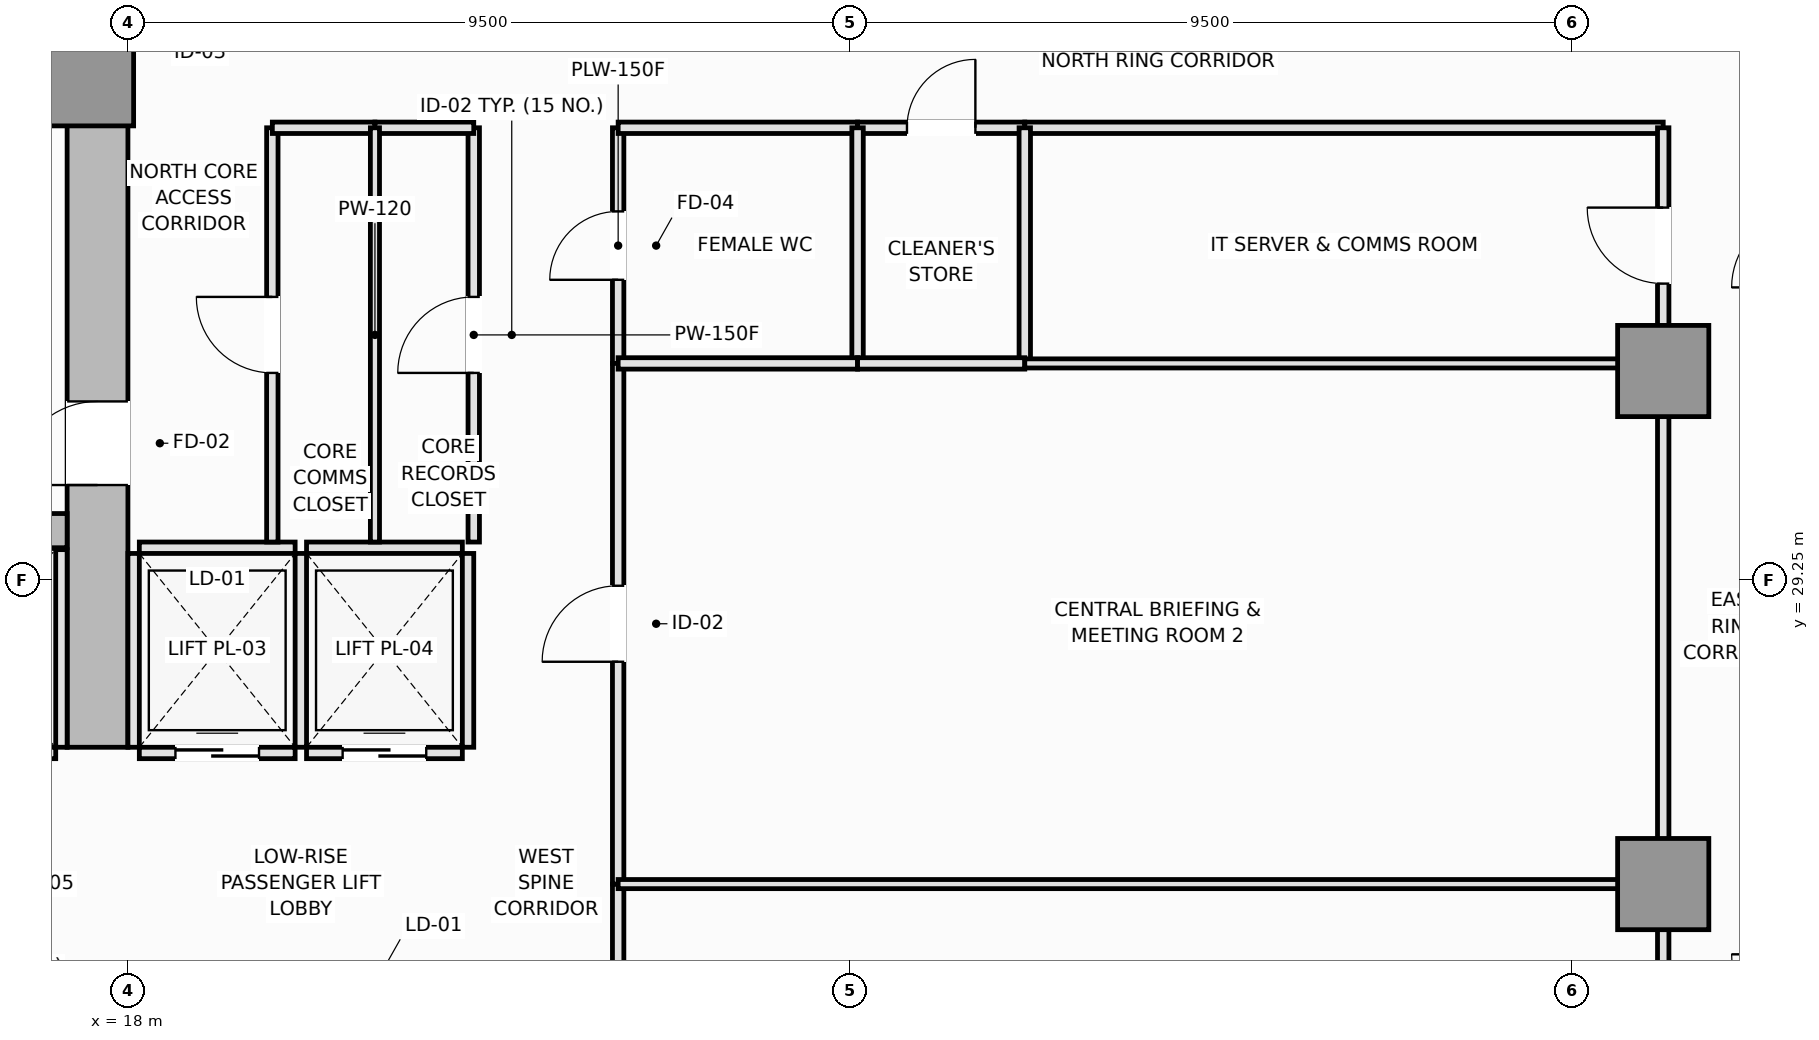
"""IFC4 building model, lengths in metres.
Left out: names, types, materials, properties, quantities, classifications, styles, units other than length and angle.
Written with IfcOpenShell. Run it as: python <this file> out.ifc"""

import sys

from ifc_helpers import new_model, si_unit, direction, frame, frame_2d, origin, origin_2d, place, context, subcontext, project, spatial, rectangle, extrude, element, fill, save


model = new_model("IFC4")
c1 = context("Model", 3, precision=1e-05, world=origin(), true_north=direction((0.0, 1.0)))
c2 = subcontext(c1, "Body", "Model", "MODEL_VIEW")
j1 = project(units=[si_unit("LENGTHUNIT", "METRE"), si_unit("PLANEANGLEUNIT", "RADIAN")], contexts=[c1])
p1 = place(None, origin())
s1 = spatial("IfcSite", under=j1, at=p1, CompositionType="ELEMENT")
p2 = place(p1, origin())
s2 = spatial("IfcBuilding", under=s1, at=p2, CompositionType="ELEMENT")
p3 = place(p2, frame((0.0, 0.0, 54.0)))
s3 = spatial("IfcBuildingStorey", under=s2, at=p3, CompositionType="ELEMENT", Elevation=54.0)
p4 = place(p3, frame((4.5, 36.1, 0.0), z_axis=(0.0, 0.0, 1.0), x_axis=(1.0, 0.0, 0.0)))
e1 = element("IfcWall", 1, at=p4, inside=s3, PredefinedType="SHEAR", context=c2, shape_type="SweptSolid", body=[
    extrude(rectangle(XDim=13.5, YDim=0.8, at=frame_2d((6.75, 0.0))), origin(), (0.0, 0.0, 1.0), 3.55),
])
p5 = place(p3, frame((17.6, 27.05, 0.0), z_axis=(0.0, 0.0, 1.0), x_axis=(0.0, 1.0, 0.0)))
e2 = element("IfcWall", 2, at=p5, inside=s3, PredefinedType="SHEAR", context=c2, shape_type="SweptSolid", body=[
    extrude(rectangle(XDim=8.65, YDim=0.8, at=frame_2d((4.325, 0.0))), origin(), (0.0, 0.0, 1.0), 3.55),
])
p6 = place(p5, frame((3.45, 0.0, 0.0)))
e3 = element("IfcOpeningElement", 3, at=p6, cuts=e2, PredefinedType="OPENING", context=c2, shape_type="SweptSolid", body=[
    extrude(rectangle(XDim=1.1, YDim=2.15, at=frame_2d((0.55, 1.075))), frame((0.0, 0.41, 0.0), z_axis=(0.0, -1.0, 0.0), x_axis=(1.0, 0.0, 0.0)), (0.0, 0.0, 1.0), 0.82),
])
p7 = place(p3, frame((5.3, 29.9, 0.0), z_axis=(0.0, 0.0, 1.0), x_axis=(1.0, 0.0, 0.0)))
e4 = element("IfcWall", 4, at=p7, inside=s3, PredefinedType="SHEAR", context=c2, shape_type="SweptSolid", body=[
    extrude(rectangle(XDim=11.9, YDim=0.45, at=frame_2d((5.95, 0.0))), origin(), (0.0, 0.0, 1.0), 3.55),
])
p8 = place(p3, frame((17.4, 35.9, 0.0), z_axis=(0.0, 0.0, 1.0), x_axis=(1.0, 0.0, 0.0)))
e5 = element("IfcColumn", 5, at=p8, inside=s3, PredefinedType="PILASTER", context=c2, shape_type="SweptSolid", body=[
    extrude(rectangle(XDim=1.35, YDim=1.35, at=origin_2d()), origin(), (0.0, 0.0, 1.0), 3.55),
])
for number, where, z_axis, x_axis in (
    (6, (38.2, 25.25, 0.0), (0.0, 0.0, 1.0), (1.0, 0.0, 0.0)),
    (7, (38.2, 32.0, 0.0), (0.0, 0.0, 1.0), (1.0, 0.0, 0.0)),
):
    element("IfcColumn", number, at=place(p3, frame(where, z_axis=z_axis, x_axis=x_axis)), inside=s3, PredefinedType="COLUMN", context=c2, shape_type="SweptSolid", body=[
        extrude(rectangle(XDim=1.2, YDim=1.2, at=origin_2d()), origin(), (0.0, 0.0, 1.0), 3.55),
    ])
p9 = place(p3, frame((18.15, 26.975, 0.0), z_axis=(0.0, 0.0, 1.0), x_axis=(1.0, 0.0, 0.0)))
e8 = element("IfcWall", 8, at=p9, inside=s3, PredefinedType="PARTITIONING", context=c2, shape_type="SweptSolid", body=[
    extrude(rectangle(XDim=2.05, YDim=0.15, at=frame_2d((1.025, 0.0))), origin(), (0.0, 0.0, 1.0), 3.37),
])
p10 = place(p9, frame((0.475, 0.0, 0.0)))
e9 = element("IfcOpeningElement", 9, at=p10, cuts=e8, PredefinedType="OPENING", context=c2, shape_type="SweptSolid", body=[
    extrude(rectangle(XDim=1.1, YDim=2.2, at=frame_2d((0.55, 1.1))), frame((0.0, 0.085, 0.0), z_axis=(0.0, -1.0, 0.0), x_axis=(1.0, 0.0, 0.0)), (0.0, 0.0, 1.0), 0.17),
])
p11 = place(p3, frame((18.15, 29.675, 0.0), z_axis=(0.0, 0.0, 1.0), x_axis=(1.0, 0.0, 0.0)))
e10 = element("IfcWall", 10, at=p11, inside=s3, PredefinedType="PARTITIONING", context=c2, shape_type="SweptSolid", body=[
    extrude(rectangle(XDim=2.05, YDim=0.15, at=frame_2d((1.025, 0.0))), origin(), (0.0, 0.0, 1.0), 3.37),
])
for number, where, z_axis, x_axis in (
    (11, (18.075, 27.05, 0.0), (0.0, 0.0, 1.0), (0.0, 1.0, 0.0)),
    (12, (20.275, 27.05, 0.0), (0.0, 0.0, 1.0), (0.0, 1.0, 0.0)),
):
    element("IfcWall", number, at=place(p3, frame(where, z_axis=z_axis, x_axis=x_axis)), inside=s3, PredefinedType="PARTITIONING", context=c2, shape_type="SweptSolid", body=[
        extrude(rectangle(XDim=2.55, YDim=0.15, at=frame_2d((1.275, 0.0))), origin(), (0.0, 0.0, 1.0), 3.37),
    ])
p12 = place(p3, frame((20.35, 26.975, 0.0), z_axis=(0.0, 0.0, 1.0), x_axis=(1.0, 0.0, 0.0)))
e13 = element("IfcWall", 13, at=p12, inside=s3, PredefinedType="PARTITIONING", context=c2, shape_type="SweptSolid", body=[
    extrude(rectangle(XDim=2.05, YDim=0.15, at=frame_2d((1.025, 0.0))), origin(), (0.0, 0.0, 1.0), 3.37),
])
p13 = place(p12, frame((0.475, 0.0, 0.0)))
e14 = element("IfcOpeningElement", 14, at=p13, cuts=e13, PredefinedType="OPENING", context=c2, shape_type="SweptSolid", body=[
    extrude(rectangle(XDim=1.1, YDim=2.2, at=frame_2d((0.55, 1.1))), frame((0.0, 0.085, 0.0), z_axis=(0.0, -1.0, 0.0), x_axis=(1.0, 0.0, 0.0)), (0.0, 0.0, 1.0), 0.17),
])
p14 = place(p3, frame((20.35, 29.675, 0.0), z_axis=(0.0, 0.0, 1.0), x_axis=(1.0, 0.0, 0.0)))
e15 = element("IfcWall", 15, at=p14, inside=s3, PredefinedType="PARTITIONING", context=c2, shape_type="SweptSolid", body=[
    extrude(rectangle(XDim=2.05, YDim=0.15, at=frame_2d((1.025, 0.0))), origin(), (0.0, 0.0, 1.0), 3.37),
])
p15 = place(p3, frame((22.475, 27.05, 0.0), z_axis=(0.0, 0.0, 1.0), x_axis=(0.0, 1.0, 0.0)))
e16 = element("IfcWall", 16, at=p15, inside=s3, PredefinedType="PARTITIONING", context=c2, shape_type="SweptSolid", body=[
    extrude(rectangle(XDim=2.55, YDim=0.15, at=frame_2d((1.275, 0.0))), origin(), (0.0, 0.0, 1.0), 3.37),
])
p16 = place(p3, frame((14.5, 26.975, 0.0), z_axis=(0.0, 0.0, 1.0), x_axis=(1.0, 0.0, 0.0)))
e17 = element("IfcWall", 17, at=p16, inside=s3, PredefinedType="PARTITIONING", context=c2, shape_type="SweptSolid", body=[
    extrude(rectangle(XDim=2.55, YDim=0.15, at=frame_2d((1.275, 0.0))), origin(), (0.0, 0.0, 1.0), 3.37),
])
p17 = place(p16, frame((0.625, 0.0, 0.0)))
e18 = element("IfcOpeningElement", 18, at=p17, cuts=e17, PredefinedType="OPENING", context=c2, shape_type="SweptSolid", body=[
    extrude(rectangle(XDim=1.3, YDim=2.2, at=frame_2d((0.65, 1.1))), frame((0.0, 0.085, 0.0), z_axis=(0.0, -1.0, 0.0), x_axis=(1.0, 0.0, 0.0)), (0.0, 0.0, 1.0), 0.17),
])
p18 = place(p3, frame((17.125, 27.05, 0.0), z_axis=(0.0, 0.0, 1.0), x_axis=(0.0, 1.0, 0.0)))
e19 = element("IfcWall", 19, at=p18, inside=s3, PredefinedType="PARTITIONING", context=c2, shape_type="SweptSolid", body=[
    extrude(rectangle(XDim=2.6, YDim=0.15, at=frame_2d((1.3, 0.0))), origin(), (0.0, 0.0, 1.0), 3.37),
])
p19 = place(p3, frame((22.55, 29.75, 0.0), z_axis=(0.0, 0.0, 1.0), x_axis=(0.0, 1.0, 0.0)))
e20 = element("IfcWall", 20, at=p19, inside=s3, PredefinedType="PARTITIONING", context=c2, shape_type="SweptSolid", body=[
    extrude(rectangle(XDim=5.45, YDim=0.15, at=frame_2d((2.725, 0.0))), origin(), (0.0, 0.0, 1.0), 3.01),
])
p20 = place(p19, frame((2.225, 0.0, 0.0)))
e21 = element("IfcOpeningElement", 21, at=p20, cuts=e20, PredefinedType="OPENING", context=c2, shape_type="SweptSolid", body=[
    extrude(rectangle(XDim=1.0, YDim=2.15, at=frame_2d((0.5, 1.075))), frame((0.0, 0.085, 0.0), z_axis=(0.0, -1.0, 0.0), x_axis=(1.0, 0.0, 0.0)), (0.0, 0.0, 1.0), 0.17),
])
p21 = place(p3, frame((24.45, 32.1, 0.0), z_axis=(0.0, 0.0, 1.0), x_axis=(0.0, 1.0, 0.0)))
e22 = element("IfcWall", 22, at=p21, inside=s3, PredefinedType="PLUMBINGWALL", context=c2, shape_type="SweptSolid", body=[
    extrude(rectangle(XDim=3.1, YDim=0.15, at=frame_2d((1.55, 0.0))), origin(), (0.0, 0.0, 1.0), 3.37),
])
p22 = place(p21, frame((1.1, 0.0, 0.0)))
e23 = element("IfcOpeningElement", 23, at=p22, cuts=e22, PredefinedType="OPENING", context=c2, shape_type="SweptSolid", body=[
    extrude(rectangle(XDim=0.9, YDim=2.1, at=frame_2d((0.45, 1.05))), frame((0.0, 0.085, 0.0), z_axis=(0.0, -1.0, 0.0), x_axis=(1.0, 0.0, 0.0)), (0.0, 0.0, 1.0), 0.17),
])
p23 = place(p3, frame((24.45, 18.4, 0.0), z_axis=(0.0, 0.0, 1.0), x_axis=(0.0, 1.0, 0.0)))
e24 = element("IfcWall", 24, at=p23, inside=s3, PredefinedType="PARTITIONING", context=c2, shape_type="SweptSolid", body=[
    extrude(rectangle(XDim=6.85, YDim=0.15, at=frame_2d((3.425, 0.0))), origin(), (0.0, 0.0, 1.0), 3.37),
])
p24 = place(p23, frame((2.925, 0.0, 0.0)))
e25 = element("IfcOpeningElement", 25, at=p24, cuts=e24, PredefinedType="OPENING", context=c2, shape_type="SweptSolid", body=[
    extrude(rectangle(XDim=1.0, YDim=2.15, at=frame_2d((0.5, 1.075))), frame((0.0, 0.085, 0.0), z_axis=(0.0, -1.0, 0.0), x_axis=(1.0, 0.0, 0.0)), (0.0, 0.0, 1.0), 0.17),
])
p25 = place(p3, frame((24.45, 25.25, 0.0), z_axis=(0.0, 0.0, 1.0), x_axis=(0.0, 1.0, 0.0)))
e26 = element("IfcWall", 26, at=p25, inside=s3, PredefinedType="PARTITIONING", context=c2, shape_type="SweptSolid", body=[
    extrude(rectangle(XDim=6.85, YDim=0.15, at=frame_2d((3.425, 0.0))), origin(), (0.0, 0.0, 1.0), 3.37),
])
p26 = place(p25, frame((2.925, 0.0, 0.0)))
e27 = element("IfcOpeningElement", 27, at=p26, cuts=e26, PredefinedType="OPENING", context=c2, shape_type="SweptSolid", body=[
    extrude(rectangle(XDim=1.0, YDim=2.15, at=frame_2d((0.5, 1.075))), frame((0.0, 0.085, 0.0), z_axis=(0.0, -1.0, 0.0), x_axis=(1.0, 0.0, 0.0)), (0.0, 0.0, 1.0), 0.17),
])
p27 = place(p3, frame((19.9, 29.75, 0.0), z_axis=(0.0, 0.0, 1.0), x_axis=(0.0, 1.0, 0.0)))
e28 = element("IfcWall", 28, at=p27, inside=s3, PredefinedType="PARTITIONING", context=c2, shape_type="SweptSolid", body=[
    extrude(rectangle(XDim=5.45, YDim=0.15, at=frame_2d((2.725, 0.0))), origin(), (0.0, 0.0, 1.0), 3.37),
])
p28 = place(p27, frame((2.225, 0.0, 0.0)))
e29 = element("IfcOpeningElement", 29, at=p28, cuts=e28, PredefinedType="OPENING", context=c2, shape_type="SweptSolid", body=[
    extrude(rectangle(XDim=1.0, YDim=2.15, at=frame_2d((0.5, 1.075))), frame((0.0, 0.085, 0.0), z_axis=(0.0, -1.0, 0.0), x_axis=(1.0, 0.0, 0.0)), (0.0, 0.0, 1.0), 0.17),
])
p29 = place(p3, frame((19.9, 35.2, 0.0), z_axis=(0.0, 0.0, 1.0), x_axis=(1.0, 0.0, 0.0)))
e30 = element("IfcWall", 30, at=p29, inside=s3, PredefinedType="PARTITIONING", context=c2, shape_type="SweptSolid", body=[
    extrude(rectangle(XDim=1.35, YDim=0.15, at=frame_2d((0.675, 0.0))), origin(), (0.0, 0.0, 1.0), 3.37),
])
p30 = place(p3, frame((21.25, 35.2, 0.0), z_axis=(0.0, 0.0, 1.0), x_axis=(1.0, 0.0, 0.0)))
e31 = element("IfcWall", 31, at=p30, inside=s3, PredefinedType="PARTITIONING", context=c2, shape_type="SweptSolid", body=[
    extrude(rectangle(XDim=1.3, YDim=0.15, at=frame_2d((0.65, 0.0))), origin(), (0.0, 0.0, 1.0), 3.37),
])
p31 = place(p3, frame((24.45, 35.2, 0.0), z_axis=(0.0, 0.0, 1.0), x_axis=(1.0, 0.0, 0.0)))
e32 = element("IfcWall", 32, at=p31, inside=s3, PredefinedType="PLUMBINGWALL", context=c2, shape_type="SweptSolid", body=[
    extrude(rectangle(XDim=3.15, YDim=0.15, at=frame_2d((1.575, 0.0))), origin(), (0.0, 0.0, 1.0), 3.37),
])
p32 = place(p3, frame((27.6, 35.2, 0.0), z_axis=(0.0, 0.0, 1.0), x_axis=(1.0, 0.0, 0.0)))
e33 = element("IfcWall", 33, at=p32, inside=s3, PredefinedType="PLUMBINGWALL", context=c2, shape_type="SweptSolid", body=[
    extrude(rectangle(XDim=2.2, YDim=0.15, at=frame_2d((1.1, 0.0))), origin(), (0.0, 0.0, 1.0), 3.37),
])
p33 = place(p32, frame((0.65, 0.0, 0.0)))
e34 = element("IfcOpeningElement", 34, at=p33, cuts=e33, PredefinedType="OPENING", context=c2, shape_type="SweptSolid", body=[
    extrude(rectangle(XDim=0.9, YDim=2.1, at=frame_2d((0.45, 1.05))), frame((0.0, 0.085, 0.0), z_axis=(0.0, -1.0, 0.0), x_axis=(1.0, 0.0, 0.0)), (0.0, 0.0, 1.0), 0.17),
])
p34 = place(p3, frame((29.8, 35.2, 0.0), z_axis=(0.0, 0.0, 1.0), x_axis=(1.0, 0.0, 0.0)))
e35 = element("IfcWall", 35, at=p34, inside=s3, PredefinedType="PARTITIONING", context=c2, shape_type="SweptSolid", body=[
    extrude(rectangle(XDim=8.4, YDim=0.15, at=frame_2d((4.2, 0.0))), origin(), (0.0, 0.0, 1.0), 3.37),
])
p35 = place(p3, frame((38.2, 32.1, 0.0), z_axis=(0.0, 0.0, 1.0), x_axis=(0.0, 1.0, 0.0)))
e36 = element("IfcWall", 36, at=p35, inside=s3, PredefinedType="PARTITIONING", context=c2, shape_type="SweptSolid", body=[
    extrude(rectangle(XDim=3.1, YDim=0.15, at=frame_2d((1.55, 0.0))), origin(), (0.0, 0.0, 1.0), 2.82),
])
p36 = place(p35, frame((1.05, 0.0, 0.0)))
e37 = element("IfcOpeningElement", 37, at=p36, cuts=e36, PredefinedType="OPENING", context=c2, shape_type="SweptSolid", body=[
    extrude(rectangle(XDim=1.0, YDim=2.15, at=frame_2d((0.5, 1.075))), frame((0.0, 0.085, 0.0), z_axis=(0.0, -1.0, 0.0), x_axis=(1.0, 0.0, 0.0)), (0.0, 0.0, 1.0), 0.17),
])
for number, where, z_axis, x_axis in (
    (38, (38.2, 18.4, 0.0), (0.0, 0.0, 1.0), (0.0, 1.0, 0.0)),
    (39, (38.2, 25.25, 0.0), (0.0, 0.0, 1.0), (0.0, 1.0, 0.0)),
):
    element("IfcWall", number, at=place(p3, frame(where, z_axis=z_axis, x_axis=x_axis)), inside=s3, PredefinedType="PARTITIONING", context=c2, shape_type="SweptSolid", body=[
        extrude(rectangle(XDim=6.85, YDim=0.15, at=frame_2d((3.425, 0.0))), origin(), (0.0, 0.0, 1.0), 2.82),
    ])
p37 = place(p3, frame((21.25, 29.75, 0.0), z_axis=(0.0, 0.0, 1.0), x_axis=(0.0, 1.0, 0.0)))
e40 = element("IfcWall", 40, at=p37, inside=s3, PredefinedType="PARTITIONING", context=c2, shape_type="SweptSolid", body=[
    extrude(rectangle(XDim=5.45, YDim=0.12, at=frame_2d((2.725, 0.0))), origin(), (0.0, 0.0, 1.0), 3.37),
])
p38 = place(p3, frame((27.6, 32.1, 0.0), z_axis=(0.0, 0.0, 1.0), x_axis=(0.0, 1.0, 0.0)))
e41 = element("IfcWall", 41, at=p38, inside=s3, PredefinedType="PLUMBINGWALL", context=c2, shape_type="SweptSolid", body=[
    extrude(rectangle(XDim=3.1, YDim=0.15, at=frame_2d((1.55, 0.0))), origin(), (0.0, 0.0, 1.0), 3.37),
])
p39 = place(p3, frame((24.45, 32.1, 0.0), z_axis=(0.0, 0.0, 1.0), x_axis=(1.0, 0.0, 0.0)))
e42 = element("IfcWall", 42, at=p39, inside=s3, PredefinedType="PLUMBINGWALL", context=c2, shape_type="SweptSolid", body=[
    extrude(rectangle(XDim=3.15, YDim=0.15, at=frame_2d((1.575, 0.0))), origin(), (0.0, 0.0, 1.0), 2.72),
])
p40 = place(p3, frame((29.8, 32.1, 0.0), z_axis=(0.0, 0.0, 1.0), x_axis=(0.0, 1.0, 0.0)))
e43 = element("IfcWall", 43, at=p40, inside=s3, PredefinedType="PLUMBINGWALL", context=c2, shape_type="SweptSolid", body=[
    extrude(rectangle(XDim=3.1, YDim=0.15, at=frame_2d((1.55, 0.0))), origin(), (0.0, 0.0, 1.0), 3.37),
])
p41 = place(p3, frame((27.6, 32.1, 0.0), z_axis=(0.0, 0.0, 1.0), x_axis=(1.0, 0.0, 0.0)))
e44 = element("IfcWall", 44, at=p41, inside=s3, PredefinedType="PLUMBINGWALL", context=c2, shape_type="SweptSolid", body=[
    extrude(rectangle(XDim=2.2, YDim=0.15, at=frame_2d((1.1, 0.0))), origin(), (0.0, 0.0, 1.0), 2.72),
])
p42 = place(p3, frame((29.8, 32.1, 0.0), z_axis=(0.0, 0.0, 1.0), x_axis=(1.0, 0.0, 0.0)))
e45 = element("IfcWall", 45, at=p42, inside=s3, PredefinedType="PARTITIONING", context=c2, shape_type="SweptSolid", body=[
    extrude(rectangle(XDim=8.4, YDim=0.12, at=frame_2d((4.2, 0.0))), origin(), (0.0, 0.0, 1.0), 2.72),
])
p43 = place(p3, frame((24.45, 25.25, 0.0), z_axis=(0.0, 0.0, 1.0), x_axis=(1.0, 0.0, 0.0)))
e46 = element("IfcWall", 46, at=p43, inside=s3, PredefinedType="PARTITIONING", context=c2, shape_type="SweptSolid", body=[
    extrude(rectangle(XDim=13.75, YDim=0.12, at=frame_2d((6.875, 0.0))), origin(), (0.0, 0.0, 1.0), 2.72),
])
p44 = place(p10, origin())
e47 = element("IfcDoor", 47, at=p44, inside=s3, OperationType="DOUBLE_DOOR_SLIDING", PredefinedType="DOOR", context=c2, shape_type="SweptSolid", body=[
    extrude(rectangle(XDim=1.1, YDim=2.2, at=frame_2d((0.55, 1.1))), frame((0.0, 0.025, 0.0), z_axis=(0.0, -1.0, 0.0), x_axis=(1.0, 0.0, 0.0)), (0.0, 0.0, 1.0), 0.05),
])
fill(e9, e47)
p45 = place(p13, origin())
e48 = element("IfcDoor", 48, at=p45, inside=s3, OperationType="DOUBLE_DOOR_SLIDING", PredefinedType="DOOR", context=c2, shape_type="SweptSolid", body=[
    extrude(rectangle(XDim=1.1, YDim=2.2, at=frame_2d((0.55, 1.1))), frame((0.0, 0.025, 0.0), z_axis=(0.0, -1.0, 0.0), x_axis=(1.0, 0.0, 0.0)), (0.0, 0.0, 1.0), 0.05),
])
fill(e14, e48)
p46 = place(p6, origin())
e49 = element("IfcDoor", 49, at=p46, inside=s3, OperationType="SINGLE_SWING_LEFT", PredefinedType="DOOR", context=c2, shape_type="SweptSolid", body=[
    extrude(rectangle(XDim=1.1, YDim=2.15, at=frame_2d((0.55, 1.075))), frame((0.0, 0.025, 0.0), z_axis=(0.0, -1.0, 0.0), x_axis=(1.0, 0.0, 0.0)), (0.0, 0.0, 1.0), 0.05),
])
fill(e3, e49)
p47 = place(p20, origin())
e50 = element("IfcDoor", 50, at=p47, inside=s3, OperationType="SINGLE_SWING_LEFT", PredefinedType="DOOR", context=c2, shape_type="SweptSolid", body=[
    extrude(rectangle(XDim=1.0, YDim=2.15, at=frame_2d((0.5, 1.075))), frame((0.0, 0.025, 0.0), z_axis=(0.0, -1.0, 0.0), x_axis=(1.0, 0.0, 0.0)), (0.0, 0.0, 1.0), 0.05),
])
fill(e21, e50)
p48 = place(p22, origin())
e51 = element("IfcDoor", 51, at=p48, inside=s3, OperationType="SINGLE_SWING_LEFT", PredefinedType="DOOR", context=c2, shape_type="SweptSolid", body=[
    extrude(rectangle(XDim=0.9, YDim=2.1, at=frame_2d((0.45, 1.05))), frame((0.0, 0.025, 0.0), z_axis=(0.0, -1.0, 0.0), x_axis=(1.0, 0.0, 0.0)), (0.0, 0.0, 1.0), 0.05),
])
fill(e23, e51)
p49 = place(p26, origin())
e52 = element("IfcDoor", 52, at=p49, inside=s3, OperationType="SINGLE_SWING_LEFT", PredefinedType="DOOR", context=c2, shape_type="SweptSolid", body=[
    extrude(rectangle(XDim=1.0, YDim=2.15, at=frame_2d((0.5, 1.075))), frame((0.0, 0.025, 0.0), z_axis=(0.0, -1.0, 0.0), x_axis=(1.0, 0.0, 0.0)), (0.0, 0.0, 1.0), 0.05),
])
fill(e27, e52)
p50 = place(p28, origin())
e53 = element("IfcDoor", 53, at=p50, inside=s3, OperationType="SINGLE_SWING_RIGHT", PredefinedType="DOOR", context=c2, shape_type="SweptSolid", body=[
    extrude(rectangle(XDim=1.0, YDim=2.15, at=frame_2d((0.5, 1.075))), frame((0.0, 0.025, 0.0), z_axis=(0.0, -1.0, 0.0), x_axis=(1.0, 0.0, 0.0)), (0.0, 0.0, 1.0), 0.05),
])
fill(e29, e53)
p51 = place(p33, origin())
e54 = element("IfcDoor", 54, at=p51, inside=s3, OperationType="SINGLE_SWING_RIGHT", PredefinedType="DOOR", context=c2, shape_type="SweptSolid", body=[
    extrude(rectangle(XDim=0.9, YDim=2.1, at=frame_2d((0.45, 1.05))), frame((0.0, 0.025, 0.0), z_axis=(0.0, -1.0, 0.0), x_axis=(1.0, 0.0, 0.0)), (0.0, 0.0, 1.0), 0.05),
])
fill(e34, e54)
p52 = place(p36, origin())
e55 = element("IfcDoor", 55, at=p52, inside=s3, OperationType="SINGLE_SWING_RIGHT", PredefinedType="DOOR", context=c2, shape_type="SweptSolid", body=[
    extrude(rectangle(XDim=1.0, YDim=2.15, at=frame_2d((0.5, 1.075))), frame((0.0, 0.025, 0.0), z_axis=(0.0, -1.0, 0.0), x_axis=(1.0, 0.0, 0.0)), (0.0, 0.0, 1.0), 0.05),
])
fill(e37, e55)
save(model, sys.argv[1])
